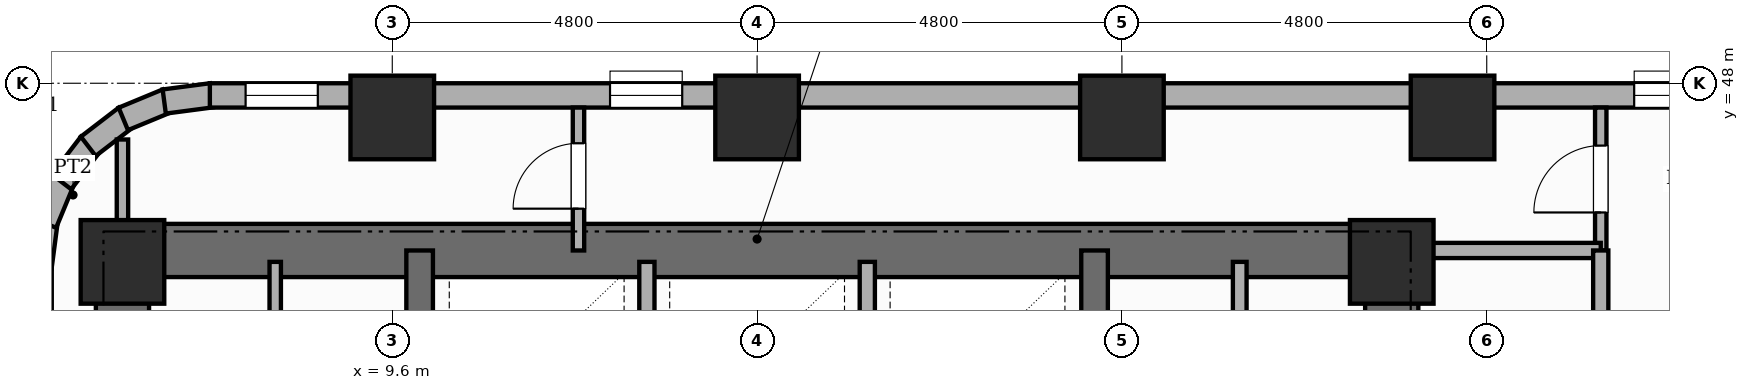
"""IFC4 building model, lengths in metres.
Left out: names, types, materials, properties, quantities, classifications, styles, units other than length and angle.
Written with IfcOpenShell. Run it as: python <this file> out.ifc"""

import sys

from ifc_helpers import new_model, si_unit, direction, frame, frame_2d, origin, origin_2d, place, context, subcontext, project, spatial, rectangle, extrude, element, fill, save


model = new_model("IFC4")
c1 = context("Model", 3, precision=1e-05, world=origin(), true_north=direction((0.0, 1.0)))
c2 = subcontext(c1, "Body", "Model", "MODEL_VIEW")
j1 = project(units=[si_unit("LENGTHUNIT", "METRE"), si_unit("PLANEANGLEUNIT", "RADIAN")], contexts=[c1])
p1 = place(None, origin())
s1 = spatial("IfcSite", under=j1, at=p1, CompositionType="ELEMENT")
p2 = place(p1, origin())
s2 = spatial("IfcBuilding", under=s1, at=p2, CompositionType="ELEMENT")
p3 = place(p2, frame((0.0, 0.0, 57.4)))
s3 = spatial("IfcBuildingStorey", under=s2, at=p3, CompositionType="ELEMENT", Elevation=57.4)
p4 = place(p3, frame((6.05, 30.55, 0.0), z_axis=(0.0, 0.0, 1.0), x_axis=(0.0, 1.0, 0.0)))
e1 = element("IfcWall", 1, at=p4, inside=s3, PredefinedType="SHEAR", context=c2, shape_type="SweptSolid", body=[
    extrude(rectangle(XDim=15.6, YDim=0.7, at=frame_2d((7.8, 0.0))), origin(), (0.0, 0.0, 1.0), 3.6),
])
p5 = place(p3, frame((22.75, 30.55, 0.0), z_axis=(0.0, 0.0, 1.0), x_axis=(0.0, 1.0, 0.0)))
e2 = element("IfcWall", 2, at=p5, inside=s3, PredefinedType="SHEAR", context=c2, shape_type="SweptSolid", body=[
    extrude(rectangle(XDim=15.6, YDim=0.7, at=frame_2d((7.8, 0.0))), origin(), (0.0, 0.0, 1.0), 3.6),
])
p6 = place(p5, frame((10.8, 0.0, 0.0)))
e3 = element("IfcOpeningElement", 3, at=p6, cuts=e2, PredefinedType="OPENING", context=c2, shape_type="SweptSolid", body=[
    extrude(rectangle(XDim=1.0, YDim=2.15, at=frame_2d((0.5, 1.075))), frame((0.0, 0.36, 0.0), z_axis=(0.0, -1.0, 0.0), x_axis=(1.0, 0.0, 0.0)), (0.0, 0.0, 1.0), 0.72),
])
p7 = place(p3, frame((6.05, 45.8, 0.0), z_axis=(0.0, 0.0, 1.0), x_axis=(1.0, 0.0, 0.0)))
e4 = element("IfcWall", 4, at=p7, inside=s3, PredefinedType="SHEAR", context=c2, shape_type="SweptSolid", body=[
    extrude(rectangle(XDim=16.7, YDim=0.7, at=frame_2d((8.35, 0.0))), origin(), (0.0, 0.0, 1.0), 3.6),
])
p8 = place(p3, frame((9.96, 30.9, 0.0), z_axis=(0.0, 0.0, 1.0), x_axis=(0.0, 1.0, 0.0)))
e5 = element("IfcWall", 5, at=p8, inside=s3, PredefinedType="SHEAR", context=c2, shape_type="SweptSolid", body=[
    extrude(rectangle(XDim=14.9, YDim=0.35, at=frame_2d((7.45, 0.0))), origin(), (0.0, 0.0, 1.0), 3.6),
])
p9 = place(p8, frame((0.65, 0.0, 0.0)))
e6 = element("IfcOpeningElement", 6, at=p9, cuts=e5, PredefinedType="OPENING", context=c2, shape_type="SweptSolid", body=[
    extrude(rectangle(XDim=0.95, YDim=2.1, at=frame_2d((0.475, 1.05))), frame((0.0, 0.185, 0.0), z_axis=(0.0, -1.0, 0.0), x_axis=(1.0, 0.0, 0.0)), (0.0, 0.0, 1.0), 0.37),
])
p10 = place(p8, frame((10.45, 0.0, 0.0)))
e7 = element("IfcOpeningElement", 7, at=p10, cuts=e5, PredefinedType="OPENING", context=c2, shape_type="SweptSolid", body=[
    extrude(rectangle(XDim=1.0, YDim=2.15, at=frame_2d((0.5, 1.075))), frame((0.0, 0.185, 0.0), z_axis=(0.0, -1.0, 0.0), x_axis=(1.0, 0.0, 0.0)), (0.0, 0.0, 1.0), 0.37),
])
p11 = place(p3, frame((18.84, 30.9, 0.0), z_axis=(0.0, 0.0, 1.0), x_axis=(0.0, 1.0, 0.0)))
e8 = element("IfcWall", 8, at=p11, inside=s3, PredefinedType="SHEAR", context=c2, shape_type="SweptSolid", body=[
    extrude(rectangle(XDim=14.9, YDim=0.35, at=frame_2d((7.45, 0.0))), origin(), (0.0, 0.0, 1.0), 3.6),
])
p12 = place(p11, frame((0.65, 0.0, 0.0)))
e9 = element("IfcOpeningElement", 9, at=p12, cuts=e8, PredefinedType="OPENING", context=c2, shape_type="SweptSolid", body=[
    extrude(rectangle(XDim=0.95, YDim=2.1, at=frame_2d((0.475, 1.05))), frame((0.0, 0.185, 0.0), z_axis=(0.0, -1.0, 0.0), x_axis=(1.0, 0.0, 0.0)), (0.0, 0.0, 1.0), 0.37),
])
p13 = place(p11, frame((10.45, 0.0, 0.0)))
e10 = element("IfcOpeningElement", 10, at=p13, cuts=e8, PredefinedType="OPENING", context=c2, shape_type="SweptSolid", body=[
    extrude(rectangle(XDim=1.0, YDim=2.15, at=frame_2d((0.5, 1.075))), frame((0.0, 0.185, 0.0), z_axis=(0.0, -1.0, 0.0), x_axis=(1.0, 0.0, 0.0)), (0.0, 0.0, 1.0), 0.37),
])
for number, where, z_axis, x_axis in (
    (11, (6.05, 45.65, 0.0), (0.0, 0.0, 1.0), (1.0, 0.0, 0.0)),
    (12, (9.6, 47.55, 0.0), (0.0, 0.0, 1.0), (1.0, 0.0, 0.0)),
    (13, (14.4, 47.55, 0.0), (0.0, 0.0, 1.0), (1.0, 0.0, 0.0)),
    (14, (19.2, 47.55, 0.0), (0.0, 0.0, 1.0), (1.0, 0.0, 0.0)),
    (15, (22.75, 45.65, 0.0), (0.0, 0.0, 1.0), (1.0, 0.0, 0.0)),
    (16, (23.55, 47.55, 0.0), (0.0, 0.0, 1.0), (1.0, 0.0, 0.0)),
):
    element("IfcColumn", number, at=place(p3, frame(where, z_axis=z_axis, x_axis=x_axis)), inside=s3, PredefinedType="COLUMN", context=c2, shape_type="SweptSolid", body=[
        extrude(rectangle(XDim=1.1, YDim=1.1, at=origin_2d()), origin(), (0.0, 0.0, 1.0), 3.6),
    ])
for number, where, z_axis, x_axis in (
    (17, (4.958, 45.579, 0.0), (0.0, 0.0, 1.0), (0.131, 0.991, 0.0)),
    (18, (5.03, 46.16, 0.0), (0.0, 0.0, 1.0), (0.383, 0.924, 0.0)),
):
    element("IfcWall", number, at=place(p3, frame(where, z_axis=z_axis, x_axis=x_axis)), inside=s3, PredefinedType="STANDARD", context=c2, shape_type="SweptSolid", body=[
        extrude(rectangle(XDim=0.626, YDim=0.32, at=frame_2d((0.313, 0.0))), origin(), (0.0, 0.0, 1.0), 3.35),
    ])
p14 = place(p3, frame((5.248, 46.703, 0.0), z_axis=(0.0, 0.0, 1.0), x_axis=(0.608938521285, 0.7932174212, 0.0)))
e19 = element("IfcWall", 19, at=p14, inside=s3, PredefinedType="STANDARD", context=c2, shape_type="SweptSolid", body=[
    extrude(rectangle(XDim=0.627, YDim=0.32, at=frame_2d((0.313, 0.0))), origin(), (0.0, 0.0, 1.0), 3.35),
])
p15 = place(p3, frame((5.6, 47.17, 0.0), z_axis=(0.0, 0.0, 1.0), x_axis=(0.793405610854, 0.608693302629, 0.0)))
e20 = element("IfcWall", 20, at=p15, inside=s3, PredefinedType="STANDARD", context=c2, shape_type="SweptSolid", body=[
    extrude(rectangle(XDim=0.626, YDim=0.32, at=frame_2d((0.313, 0.0))), origin(), (0.0, 0.0, 1.0), 3.35),
])
p16 = place(p3, frame((6.061, 47.531, 0.0), z_axis=(0.0, 0.0, 1.0), x_axis=(0.923836271867, 0.382787856107, 0.0)))
e21 = element("IfcWall", 21, at=p16, inside=s3, PredefinedType="STANDARD", context=c2, shape_type="SweptSolid", body=[
    extrude(rectangle(XDim=0.626, YDim=0.32, at=frame_2d((0.313, 0.0))), origin(), (0.0, 0.0, 1.0), 3.35),
])
p17 = place(p3, frame((6.6, 47.76, 0.0), z_axis=(0.0, 0.0, 1.0), x_axis=(0.991447664465, 0.130504898859, 0.0)))
e22 = element("IfcWall", 22, at=p17, inside=s3, PredefinedType="STANDARD", context=c2, shape_type="SweptSolid", body=[
    extrude(rectangle(XDim=0.627, YDim=0.32, at=frame_2d((0.313, 0.0))), origin(), (0.0, 0.0, 1.0), 3.35),
])
p18 = place(p3, frame((7.2, 47.84, 0.0), z_axis=(0.0, 0.0, 1.0), x_axis=(1.0, 0.0, 0.0)))
e23 = element("IfcWall", 23, at=p18, inside=s3, PredefinedType="STANDARD", context=c2, shape_type="SweptSolid", body=[
    extrude(rectangle(XDim=48.0, YDim=0.32, at=frame_2d((24.0, 0.0))), origin(), (0.0, 0.0, 1.0), 2.53),
])
p19 = place(p18, frame((28.803, 0.0, 0.65)))
e24 = element("IfcOpeningElement", 24, at=p19, cuts=e23, PredefinedType="OPENING", context=c2, shape_type="SweptSolid", body=[
    extrude(rectangle(XDim=1.4, YDim=1.1, at=frame_2d((0.7, 0.55))), frame((0.0, 0.17, 0.0), z_axis=(0.0, -1.0, 0.0), x_axis=(1.0, 0.0, 0.0)), (0.0, 0.0, 1.0), 0.34),
])
p20 = place(p18, frame((43.414, 0.0, 0.45)))
e25 = element("IfcOpeningElement", 25, at=p20, cuts=e23, PredefinedType="OPENING", context=c2, shape_type="SweptSolid", body=[
    extrude(rectangle(XDim=0.95, YDim=1.8, at=frame_2d((0.475, 0.9))), frame((0.0, 0.17, 0.0), z_axis=(0.0, -1.0, 0.0), x_axis=(1.0, 0.0, 0.0)), (0.0, 0.0, 1.0), 0.34),
])
p21 = place(p18, frame((18.74, 0.0, 0.45)))
e26 = element("IfcOpeningElement", 26, at=p21, cuts=e23, PredefinedType="OPENING", context=c2, shape_type="SweptSolid", body=[
    extrude(rectangle(XDim=0.95, YDim=1.8, at=frame_2d((0.475, 0.9))), frame((0.0, 0.17, 0.0), z_axis=(0.0, -1.0, 0.0), x_axis=(1.0, 0.0, 0.0)), (0.0, 0.0, 1.0), 0.34),
])
p22 = place(p18, frame((37.825, 0.0, 0.65)))
e27 = element("IfcOpeningElement", 27, at=p22, cuts=e23, PredefinedType="OPENING", context=c2, shape_type="SweptSolid", body=[
    extrude(rectangle(XDim=1.4, YDim=1.1, at=frame_2d((0.7, 0.55))), frame((0.0, 0.17, 0.0), z_axis=(0.0, -1.0, 0.0), x_axis=(1.0, 0.0, 0.0)), (0.0, 0.0, 1.0), 0.34),
])
p23 = place(p18, frame((0.47, 0.0, 0.45)))
e28 = element("IfcOpeningElement", 28, at=p23, cuts=e23, PredefinedType="OPENING", context=c2, shape_type="SweptSolid", body=[
    extrude(rectangle(XDim=0.95, YDim=1.8, at=frame_2d((0.475, 0.9))), frame((0.0, 0.17, 0.0), z_axis=(0.0, -1.0, 0.0), x_axis=(1.0, 0.0, 0.0)), (0.0, 0.0, 1.0), 0.34),
])
p24 = place(p18, frame((5.265, 0.0, 0.45)))
e29 = element("IfcOpeningElement", 29, at=p24, cuts=e23, PredefinedType="OPENING", context=c2, shape_type="SweptSolid", body=[
    extrude(rectangle(XDim=0.95, YDim=1.8, at=frame_2d((0.475, 0.9))), frame((0.0, 0.17, 0.0), z_axis=(0.0, -1.0, 0.0), x_axis=(1.0, 0.0, 0.0)), (0.0, 0.0, 1.0), 0.34),
])
p25 = place(p18, frame((23.43, 0.0, 0.65)))
e30 = element("IfcOpeningElement", 30, at=p25, cuts=e23, PredefinedType="OPENING", context=c2, shape_type="SweptSolid", body=[
    extrude(rectangle(XDim=1.4, YDim=1.1, at=frame_2d((0.7, 0.55))), frame((0.0, 0.17, 0.0), z_axis=(0.0, -1.0, 0.0), x_axis=(1.0, 0.0, 0.0)), (0.0, 0.0, 1.0), 0.34),
])
p26 = place(p18, frame((41.809, 0.0, 0.45)))
e31 = element("IfcOpeningElement", 31, at=p26, cuts=e23, PredefinedType="OPENING", context=c2, shape_type="SweptSolid", body=[
    extrude(rectangle(XDim=0.95, YDim=1.8, at=frame_2d((0.475, 0.9))), frame((0.0, 0.17, 0.0), z_axis=(0.0, -1.0, 0.0), x_axis=(1.0, 0.0, 0.0)), (0.0, 0.0, 1.0), 0.34),
])
for number, where, z_axis, x_axis in (
    (32, (12.95, 43.1, 0.0), (0.0, 0.0, 1.0), (0.0, 1.0, 0.0)),
    (33, (15.85, 43.1, 0.0), (0.0, 0.0, 1.0), (0.0, 1.0, 0.0)),
):
    element("IfcWall", number, at=place(p3, frame(where, z_axis=z_axis, x_axis=x_axis)), inside=s3, PredefinedType="POLYGONAL", context=c2, shape_type="SweptSolid", body=[
        extrude(rectangle(XDim=2.55, YDim=0.2, at=frame_2d((1.275, 0.0))), origin(), (0.0, 0.0, 1.0), 3.35),
    ])
p27 = place(p3, frame((8.06, 43.05, 0.0), z_axis=(0.0, 0.0, 1.0), x_axis=(0.0, 1.0, 0.0)))
e34 = element("IfcWall", 34, at=p27, inside=s3, PredefinedType="PARTITIONING", context=c2, shape_type="SweptSolid", body=[
    extrude(rectangle(XDim=2.6, YDim=0.15, at=frame_2d((1.3, 0.0))), origin(), (0.0, 0.0, 1.0), 3.35),
])
p28 = place(p3, frame((20.75, 43.05, 0.0), z_axis=(0.0, 0.0, 1.0), x_axis=(0.0, 1.0, 0.0)))
e35 = element("IfcWall", 35, at=p28, inside=s3, PredefinedType="PLUMBINGWALL", context=c2, shape_type="SweptSolid", body=[
    extrude(rectangle(XDim=2.6, YDim=0.18, at=frame_2d((1.3, 0.0))), origin(), (0.0, 0.0, 1.0), 3.35),
])
p29 = place(p3, frame((25.5, 45.8, 0.0), z_axis=(0.0, 0.0, 1.0), x_axis=(0.0, 1.0, 0.0)))
e36 = element("IfcWall", 36, at=p29, inside=s3, PredefinedType="PARTITIONING", context=c2, shape_type="SweptSolid", body=[
    extrude(rectangle(XDim=1.88, YDim=0.15, at=frame_2d((0.94, 0.0))), origin(), (0.0, 0.0, 1.0), 3.35),
])
p30 = place(p29, frame((0.5, 0.0, 0.0)))
e37 = element("IfcOpeningElement", 37, at=p30, cuts=e36, PredefinedType="OPENING", context=c2, shape_type="SweptSolid", body=[
    extrude(rectangle(XDim=0.88, YDim=2.1, at=frame_2d((0.44, 1.05))), frame((0.0, 0.085, 0.0), z_axis=(0.0, -1.0, 0.0), x_axis=(1.0, 0.0, 0.0)), (0.0, 0.0, 1.0), 0.17),
])
p31 = place(p3, frame((22.75, 45.8, 0.0), z_axis=(0.0, 0.0, 1.0), x_axis=(1.0, 0.0, 0.0)))
e38 = element("IfcWall", 38, at=p31, inside=s3, PredefinedType="PARTITIONING", context=c2, shape_type="SweptSolid", body=[
    extrude(rectangle(XDim=2.75, YDim=0.2, at=frame_2d((1.375, 0.0))), origin(), (0.0, 0.0, 1.0), 3.35),
])
p32 = place(p3, frame((6.05, 45.8, 0.0), z_axis=(0.0, 0.0, 1.0), x_axis=(0.0, 1.0, 0.0)))
e39 = element("IfcWall", 39, at=p32, inside=s3, PredefinedType="PARTITIONING", context=c2, shape_type="SweptSolid", body=[
    extrude(rectangle(XDim=1.46, YDim=0.15, at=frame_2d((0.73, 0.0))), origin(), (0.0, 0.0, 1.0), 3.35),
])
p33 = place(p3, frame((12.05, 45.8, 0.0), z_axis=(0.0, 0.0, 1.0), x_axis=(0.0, 1.0, 0.0)))
e40 = element("IfcWall", 40, at=p33, inside=s3, PredefinedType="PARTITIONING", context=c2, shape_type="SweptSolid", body=[
    extrude(rectangle(XDim=1.88, YDim=0.15, at=frame_2d((0.94, 0.0))), origin(), (0.0, 0.0, 1.0), 3.35),
])
p34 = place(p33, frame((0.55, 0.0, 0.0)))
e41 = element("IfcOpeningElement", 41, at=p34, cuts=e40, PredefinedType="OPENING", context=c2, shape_type="SweptSolid", body=[
    extrude(rectangle(XDim=0.86, YDim=2.1, at=frame_2d((0.43, 1.05))), frame((0.0, 0.085, 0.0), z_axis=(0.0, -1.0, 0.0), x_axis=(1.0, 0.0, 0.0)), (0.0, 0.0, 1.0), 0.17),
])
p35 = place(p3, frame((25.5, 43.05, 0.0), z_axis=(0.0, 0.0, 1.0), x_axis=(0.0, 1.0, 0.0)))
e42 = element("IfcWall", 42, at=p35, inside=s3, PredefinedType="PARTITIONING", context=c2, shape_type="SweptSolid", body=[
    extrude(rectangle(XDim=2.75, YDim=0.2, at=frame_2d((1.375, 0.0))), origin(), (0.0, 0.0, 1.0), 3.35),
])
p36 = place(p21, origin())
e43 = element("IfcWindow", 43, at=p36, inside=s3, PartitioningType="SINGLE_PANEL", PredefinedType="WINDOW", context=c2, shape_type="SweptSolid", body=[
    extrude(rectangle(XDim=0.95, YDim=1.8, at=frame_2d((0.475, 0.9))), frame((0.0, 0.03, 0.0), z_axis=(0.0, -1.0, 0.0), x_axis=(1.0, 0.0, 0.0)), (0.0, 0.0, 1.0), 0.06),
])
fill(e26, e43)
p37 = place(p23, origin())
e44 = element("IfcWindow", 44, at=p37, inside=s3, PartitioningType="SINGLE_PANEL", PredefinedType="WINDOW", context=c2, shape_type="SweptSolid", body=[
    extrude(rectangle(XDim=0.95, YDim=1.8, at=frame_2d((0.475, 0.9))), frame((0.0, 0.03, 0.0), z_axis=(0.0, -1.0, 0.0), x_axis=(1.0, 0.0, 0.0)), (0.0, 0.0, 1.0), 0.06),
])
fill(e28, e44)
p38 = place(p24, origin())
e45 = element("IfcWindow", 45, at=p38, inside=s3, PartitioningType="SINGLE_PANEL", PredefinedType="WINDOW", context=c2, shape_type="SweptSolid", body=[
    extrude(rectangle(XDim=0.95, YDim=1.8, at=frame_2d((0.475, 0.9))), frame((0.0, 0.03, 0.0), z_axis=(0.0, -1.0, 0.0), x_axis=(1.0, 0.0, 0.0)), (0.0, 0.0, 1.0), 0.06),
])
fill(e29, e45)
p39 = place(p30, origin())
e46 = element("IfcDoor", 46, at=p39, inside=s3, OperationType="SINGLE_SWING_LEFT", PredefinedType="DOOR", context=c2, shape_type="SweptSolid", body=[
    extrude(rectangle(XDim=0.88, YDim=2.1, at=frame_2d((0.44, 1.05))), frame((0.0, 0.025, 0.0), z_axis=(0.0, -1.0, 0.0), x_axis=(1.0, 0.0, 0.0)), (0.0, 0.0, 1.0), 0.05),
])
fill(e37, e46)
p40 = place(p34, origin())
e47 = element("IfcDoor", 47, at=p40, inside=s3, OperationType="SINGLE_SWING_LEFT", PredefinedType="DOOR", context=c2, shape_type="SweptSolid", body=[
    extrude(rectangle(XDim=0.86, YDim=2.1, at=frame_2d((0.43, 1.05))), frame((0.0, 0.025, 0.0), z_axis=(0.0, -1.0, 0.0), x_axis=(1.0, 0.0, 0.0)), (0.0, 0.0, 1.0), 0.05),
])
fill(e41, e47)
save(model, sys.argv[1])
